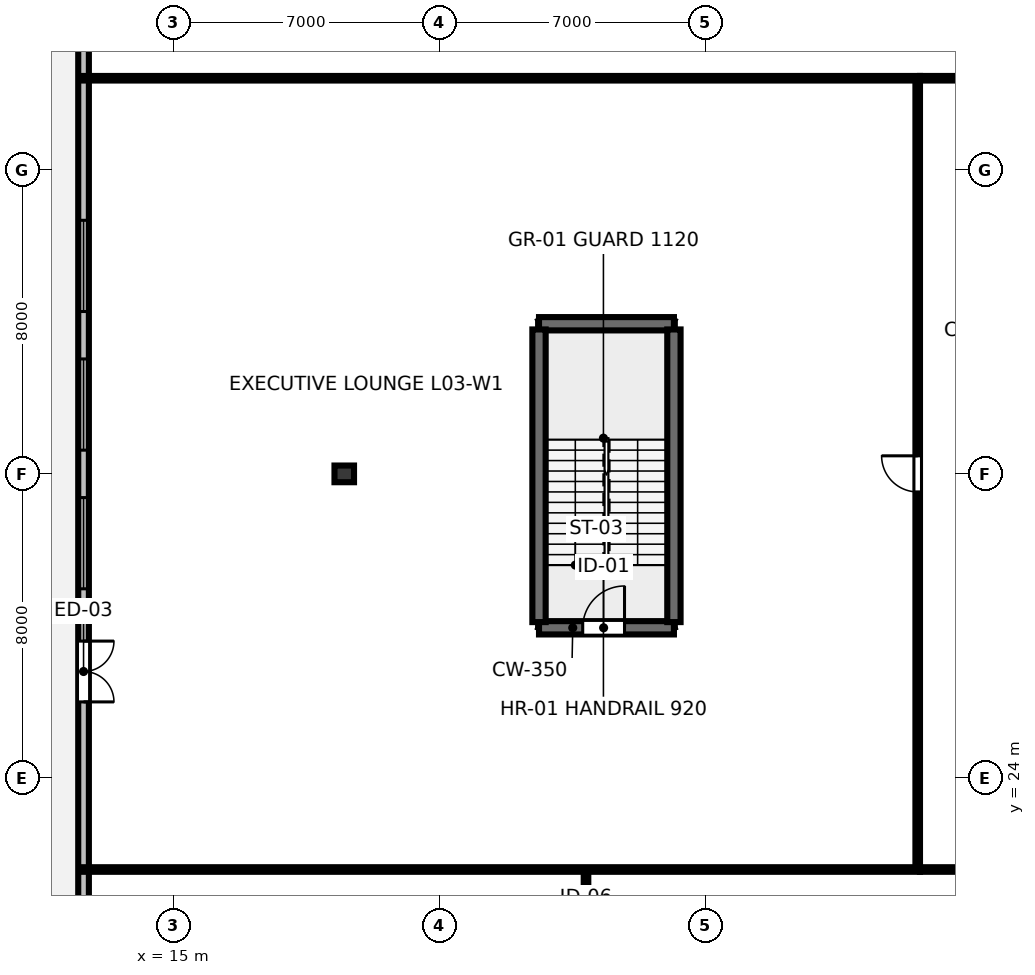
"""IFC4 building model, lengths in metres.
Left out: names, types, materials, properties, quantities, classifications, styles, units other than length and angle.
Written with IfcOpenShell. Run it as: python <this file> out.ifc"""

import sys

from ifc_helpers import new_model, si_unit, direction, frame, frame_2d, origin, origin_2d, place, context, subcontext, project, spatial, rectangle, i_section, extrude, element, fill, save


model = new_model("IFC4")
c1 = context("Model", 3, precision=1e-05, world=origin(), true_north=direction((0.0, 1.0)))
c2 = subcontext(c1, "Body", "Model", "MODEL_VIEW")
j1 = project(units=[si_unit("LENGTHUNIT", "METRE"), si_unit("PLANEANGLEUNIT", "RADIAN")], contexts=[c1])
p1 = place(None, origin())
s1 = spatial("IfcSite", under=j1, at=p1, CompositionType="ELEMENT")
p2 = place(p1, origin())
s2 = spatial("IfcBuilding", under=s1, at=p2, CompositionType="ELEMENT")
p3 = place(p2, frame((0.0, 0.0, 14.0)))
s3 = spatial("IfcBuildingStorey", under=s2, at=p3, CompositionType="ELEMENT", Elevation=14.0)
p4 = place(p3, frame((19.5, 32.0, 0.0), z_axis=(0.0, 0.0, 1.0), x_axis=(0.0, 1.0, 0.0)))
e1 = element("IfcColumn", 1, at=p4, inside=s3, PredefinedType="COLUMN", context=c2, shape_type="SweptSolid", body=[
    extrude(i_section(OverallWidth=0.439, OverallDepth=0.514, WebThickness=0.06, FlangeThickness=0.097, FilletRadius=0.025, at=origin_2d()), origin(), (0.0, 0.0, 1.0), 4.208),
])
p5 = place(p3, frame((12.64, 51.34, 0.0), z_axis=(0.0, 0.0, 1.0), x_axis=(0.0, -1.0, 0.0)))
e2 = element("IfcWall", 2, at=p5, inside=s3, PredefinedType="STANDARD", context=c2, shape_type="SweptSolid", body=[
    extrude(rectangle(XDim=38.68, YDim=0.28, at=frame_2d((19.34, 0.0))), origin(), (0.0, 0.0, 1.0), 4.21),
])
p6 = place(p5, frame((23.74, 0.0, 0.0)))
e3 = element("IfcOpeningElement", 3, at=p6, cuts=e2, PredefinedType="OPENING", context=c2, shape_type="SweptSolid", body=[
    extrude(rectangle(XDim=1.6, YDim=2.15, at=frame_2d((0.8, 1.075))), frame((0.0, 0.15, 0.0), z_axis=(0.0, -1.0, 0.0), x_axis=(1.0, 0.0, 0.0)), (0.0, 0.0, 1.0), 0.3),
])
p7 = place(p5, frame((1.724, 0.0, 0.85)))
e4 = element("IfcOpeningElement", 4, at=p7, cuts=e2, PredefinedType="OPENING", context=c2, shape_type="SweptSolid", body=[
    extrude(rectangle(XDim=2.4, YDim=2.4, at=frame_2d((1.2, 1.2))), frame((0.0, 0.15, 0.0), z_axis=(0.0, -1.0, 0.0), x_axis=(1.0, 0.0, 0.0)), (0.0, 0.0, 1.0), 0.3),
])
p8 = place(p5, frame((5.372, 0.0, 0.85)))
e5 = element("IfcOpeningElement", 5, at=p8, cuts=e2, PredefinedType="OPENING", context=c2, shape_type="SweptSolid", body=[
    extrude(rectangle(XDim=2.4, YDim=2.4, at=frame_2d((1.2, 1.2))), frame((0.0, 0.15, 0.0), z_axis=(0.0, -1.0, 0.0), x_axis=(1.0, 0.0, 0.0)), (0.0, 0.0, 1.0), 0.3),
])
p9 = place(p5, frame((12.668, 0.0, 0.85)))
e6 = element("IfcOpeningElement", 6, at=p9, cuts=e2, PredefinedType="OPENING", context=c2, shape_type="SweptSolid", body=[
    extrude(rectangle(XDim=2.4, YDim=2.4, at=frame_2d((1.2, 1.2))), frame((0.0, 0.15, 0.0), z_axis=(0.0, -1.0, 0.0), x_axis=(1.0, 0.0, 0.0)), (0.0, 0.0, 1.0), 0.3),
])
p10 = place(p5, frame((16.316, 0.0, 0.85)))
e7 = element("IfcOpeningElement", 7, at=p10, cuts=e2, PredefinedType="OPENING", context=c2, shape_type="SweptSolid", body=[
    extrude(rectangle(XDim=2.4, YDim=2.4, at=frame_2d((1.2, 1.2))), frame((0.0, 0.15, 0.0), z_axis=(0.0, -1.0, 0.0), x_axis=(1.0, 0.0, 0.0)), (0.0, 0.0, 1.0), 0.3),
])
p11 = place(p5, frame((19.964, 0.0, 0.85)))
e8 = element("IfcOpeningElement", 8, at=p11, cuts=e2, PredefinedType="OPENING", context=c2, shape_type="SweptSolid", body=[
    extrude(rectangle(XDim=2.4, YDim=2.4, at=frame_2d((1.2, 1.2))), frame((0.0, 0.15, 0.0), z_axis=(0.0, -1.0, 0.0), x_axis=(1.0, 0.0, 0.0)), (0.0, 0.0, 1.0), 0.3),
])
p12 = place(p5, frame((30.908, 0.0, 0.85)))
e9 = element("IfcOpeningElement", 9, at=p12, cuts=e2, PredefinedType="OPENING", context=c2, shape_type="SweptSolid", body=[
    extrude(rectangle(XDim=2.4, YDim=2.4, at=frame_2d((1.2, 1.2))), frame((0.0, 0.15, 0.0), z_axis=(0.0, -1.0, 0.0), x_axis=(1.0, 0.0, 0.0)), (0.0, 0.0, 1.0), 0.3),
])
p13 = place(p5, frame((34.556, 0.0, 0.85)))
e10 = element("IfcOpeningElement", 10, at=p13, cuts=e2, PredefinedType="OPENING", context=c2, shape_type="SweptSolid", body=[
    extrude(rectangle(XDim=2.4, YDim=2.4, at=frame_2d((1.2, 1.2))), frame((0.0, 0.15, 0.0), z_axis=(0.0, -1.0, 0.0), x_axis=(1.0, 0.0, 0.0)), (0.0, 0.0, 1.0), 0.3),
])
p14 = place(p3, frame((25.862, 21.59, 0.0), z_axis=(0.0, 0.0, 1.0), x_axis=(0.0, -1.0, 0.0)))
e11 = element("IfcWall", 11, at=p14, inside=s3, PredefinedType="MOVABLE", context=c2, shape_type="SweptSolid", body=[
    extrude(rectangle(XDim=13.45, YDim=0.12, at=frame_2d((6.725, 0.0))), origin(), (0.0, 0.0, 1.0), 3.31),
])
p15 = place(p14, frame((1.4, 0.0, 0.0)))
e12 = element("IfcOpeningElement", 12, at=p15, cuts=e11, PredefinedType="OPENING", context=c2, shape_type="SweptSolid", body=[
    extrude(rectangle(XDim=0.9, YDim=2.15, at=frame_2d((0.45, 1.075))), frame((0.0, 0.07, 0.0), z_axis=(0.0, -1.0, 0.0), x_axis=(1.0, 0.0, 0.0)), (0.0, 0.0, 1.0), 0.14),
])
p16 = place(p3, frame((34.65, 21.59, 0.0), z_axis=(0.0, 0.0, 1.0), x_axis=(1.0, 0.0, 0.0)))
e13 = element("IfcWall", 13, at=p16, inside=s3, PredefinedType="PARTITIONING", context=c2, shape_type="SweptSolid", body=[
    extrude(rectangle(XDim=22.7, YDim=0.12, at=frame_2d((11.35, 0.0))), origin(), (0.0, 0.0, 1.0), 3.31),
])
p17 = place(p16, frame((1.064, 0.0, 0.0)))
e14 = element("IfcOpeningElement", 14, at=p17, cuts=e13, PredefinedType="OPENING", context=c2, shape_type="SweptSolid", body=[
    extrude(rectangle(XDim=0.95, YDim=2.15, at=frame_2d((0.475, 1.075))), frame((0.0, 0.07, 0.0), z_axis=(0.0, -1.0, 0.0), x_axis=(1.0, 0.0, 0.0)), (0.0, 0.0, 1.0), 0.14),
])
p18 = place(p16, frame((12.274, 0.0, 0.0)))
e15 = element("IfcOpeningElement", 15, at=p18, cuts=e13, PredefinedType="OPENING", context=c2, shape_type="SweptSolid", body=[
    extrude(rectangle(XDim=0.95, YDim=2.15, at=frame_2d((0.475, 1.075))), frame((0.0, 0.07, 0.0), z_axis=(0.0, -1.0, 0.0), x_axis=(1.0, 0.0, 0.0)), (0.0, 0.0, 1.0), 0.14),
])
p19 = place(p3, frame((34.65, 42.41, 0.0), z_axis=(0.0, 0.0, 1.0), x_axis=(1.0, 0.0, 0.0)))
e16 = element("IfcWall", 16, at=p19, inside=s3, PredefinedType="PARTITIONING", context=c2, shape_type="SweptSolid", body=[
    extrude(rectangle(XDim=22.7, YDim=0.12, at=frame_2d((11.35, 0.0))), origin(), (0.0, 0.0, 1.0), 3.31),
])
p20 = place(p19, frame((11.441, 0.0, 0.0)))
e17 = element("IfcOpeningElement", 17, at=p20, cuts=e16, PredefinedType="OPENING", context=c2, shape_type="SweptSolid", body=[
    extrude(rectangle(XDim=0.95, YDim=2.15, at=frame_2d((0.475, 1.075))), frame((0.0, 0.07, 0.0), z_axis=(0.0, -1.0, 0.0), x_axis=(1.0, 0.0, 0.0)), (0.0, 0.0, 1.0), 0.14),
])
p21 = place(p3, frame((34.59, 21.65, 0.0), z_axis=(0.0, 0.0, 1.0), x_axis=(0.0, 1.0, 0.0)))
e18 = element("IfcWall", 18, at=p21, inside=s3, PredefinedType="PARTITIONING", context=c2, shape_type="SweptSolid", body=[
    extrude(rectangle(XDim=20.7, YDim=0.12, at=frame_2d((10.35, 0.0))), origin(), (0.0, 0.0, 1.0), 3.31),
])
p22 = place(p21, frame((9.875, 0.0, 0.0)))
e19 = element("IfcOpeningElement", 19, at=p22, cuts=e18, PredefinedType="OPENING", context=c2, shape_type="SweptSolid", body=[
    extrude(rectangle(XDim=0.95, YDim=2.15, at=frame_2d((0.475, 1.075))), frame((0.0, 0.07, 0.0), z_axis=(0.0, -1.0, 0.0), x_axis=(1.0, 0.0, 0.0)), (0.0, 0.0, 1.0), 0.14),
])
for number, where, z_axis, x_axis in (
    (20, (34.65, 21.59, 0.0), (0.0, 0.0, 1.0), (-1.0, 0.0, 0.0)),
    (21, (34.65, 42.41, 0.0), (0.0, 0.0, 1.0), (-1.0, 0.0, 0.0)),
):
    element("IfcWall", number, at=place(p3, frame(where, z_axis=z_axis, x_axis=x_axis)), inside=s3, PredefinedType="PARTITIONING", context=c2, shape_type="SweptSolid", body=[
        extrude(rectangle(XDim=22.01, YDim=0.12, at=frame_2d((11.005, 0.0))), origin(), (0.0, 0.0, 1.0), 3.31),
    ])
p23 = place(p3, frame((24.625, 27.95, 0.0), z_axis=(0.0, 0.0, 1.0), x_axis=(1.0, 0.0, 0.0)))
e22 = element("IfcWall", 22, at=p23, inside=s3, PredefinedType="SHEAR", context=c2, shape_type="SweptSolid", body=[
    extrude(rectangle(XDim=3.55, YDim=0.35, at=frame_2d((1.775, 0.0))), origin(), (0.0, 0.0, 1.0), 4.5),
])
p24 = place(p23, frame((1.15, 0.0, 0.0)))
e23 = element("IfcOpeningElement", 23, at=p24, cuts=e22, PredefinedType="OPENING", context=c2, shape_type="SweptSolid", body=[
    extrude(rectangle(XDim=1.1, YDim=2.15, at=frame_2d((0.55, 1.075))), frame((0.0, 0.185, 0.0), z_axis=(0.0, -1.0, 0.0), x_axis=(1.0, 0.0, 0.0)), (0.0, 0.0, 1.0), 0.37),
])
p25 = place(p3, frame((24.625, 35.95, 0.0), z_axis=(0.0, 0.0, 1.0), x_axis=(1.0, 0.0, 0.0)))
e24 = element("IfcWall", 24, at=p25, inside=s3, PredefinedType="SHEAR", context=c2, shape_type="SweptSolid", body=[
    extrude(rectangle(XDim=3.55, YDim=0.35, at=frame_2d((1.775, 0.0))), origin(), (0.0, 0.0, 1.0), 4.5),
])
for number, where, z_axis, x_axis in (
    (25, (24.625, 28.1, 0.0), (0.0, 0.0, 1.0), (0.0, 1.0, 0.0)),
    (26, (28.175, 28.1, 0.0), (0.0, 0.0, 1.0), (0.0, 1.0, 0.0)),
):
    element("IfcWall", number, at=place(p3, frame(where, z_axis=z_axis, x_axis=x_axis)), inside=s3, PredefinedType="SHEAR", context=c2, shape_type="SweptSolid", body=[
        extrude(rectangle(XDim=7.7, YDim=0.35, at=frame_2d((3.85, 0.0))), origin(), (0.0, 0.0, 1.0), 4.5),
    ])
p26 = place(p6, origin())
e27 = element("IfcDoor", 27, at=p26, inside=s3, OperationType="DOUBLE_DOOR_SINGLE_SWING", PredefinedType="DOOR", context=c2, shape_type="SweptSolid", body=[
    extrude(rectangle(XDim=1.6, YDim=2.15, at=frame_2d((0.8, 1.075))), frame((0.0, 0.025, 0.0), z_axis=(0.0, -1.0, 0.0), x_axis=(1.0, 0.0, 0.0)), (0.0, 0.0, 1.0), 0.05),
])
fill(e3, e27)
p27 = place(p9, origin())
e28 = element("IfcWindow", 28, at=p27, inside=s3, PartitioningType="SINGLE_PANEL", PredefinedType="WINDOW", context=c2, shape_type="SweptSolid", body=[
    extrude(rectangle(XDim=2.4, YDim=2.4, at=frame_2d((1.2, 1.2))), frame((0.0, 0.03, 0.0), z_axis=(0.0, -1.0, 0.0), x_axis=(1.0, 0.0, 0.0)), (0.0, 0.0, 1.0), 0.06),
])
fill(e6, e28)
p28 = place(p10, origin())
e29 = element("IfcWindow", 29, at=p28, inside=s3, PartitioningType="SINGLE_PANEL", PredefinedType="WINDOW", context=c2, shape_type="SweptSolid", body=[
    extrude(rectangle(XDim=2.4, YDim=2.4, at=frame_2d((1.2, 1.2))), frame((0.0, 0.03, 0.0), z_axis=(0.0, -1.0, 0.0), x_axis=(1.0, 0.0, 0.0)), (0.0, 0.0, 1.0), 0.06),
])
fill(e7, e29)
p29 = place(p11, origin())
e30 = element("IfcWindow", 30, at=p29, inside=s3, PartitioningType="SINGLE_PANEL", PredefinedType="WINDOW", context=c2, shape_type="SweptSolid", body=[
    extrude(rectangle(XDim=2.4, YDim=2.4, at=frame_2d((1.2, 1.2))), frame((0.0, 0.03, 0.0), z_axis=(0.0, -1.0, 0.0), x_axis=(1.0, 0.0, 0.0)), (0.0, 0.0, 1.0), 0.06),
])
fill(e8, e30)
p30 = place(p22, origin())
e31 = element("IfcDoor", 31, at=p30, inside=s3, OperationType="SINGLE_SWING_RIGHT", PredefinedType="DOOR", context=c2, shape_type="SweptSolid", body=[
    extrude(rectangle(XDim=0.95, YDim=2.15, at=frame_2d((0.475, 1.075))), frame((0.0, 0.025, 0.0), z_axis=(0.0, -1.0, 0.0), x_axis=(1.0, 0.0, 0.0)), (0.0, 0.0, 1.0), 0.05),
])
fill(e19, e31)
p31 = place(p24, origin())
e32 = element("IfcDoor", 32, at=p31, inside=s3, OperationType="SINGLE_SWING_RIGHT", PredefinedType="DOOR", context=c2, shape_type="SweptSolid", body=[
    extrude(rectangle(XDim=1.1, YDim=2.15, at=frame_2d((0.55, 1.075))), frame((0.0, 0.025, 0.0), z_axis=(0.0, -1.0, 0.0), x_axis=(1.0, 0.0, 0.0)), (0.0, 0.0, 1.0), 0.05),
])
fill(e23, e32)
save(model, sys.argv[1])
